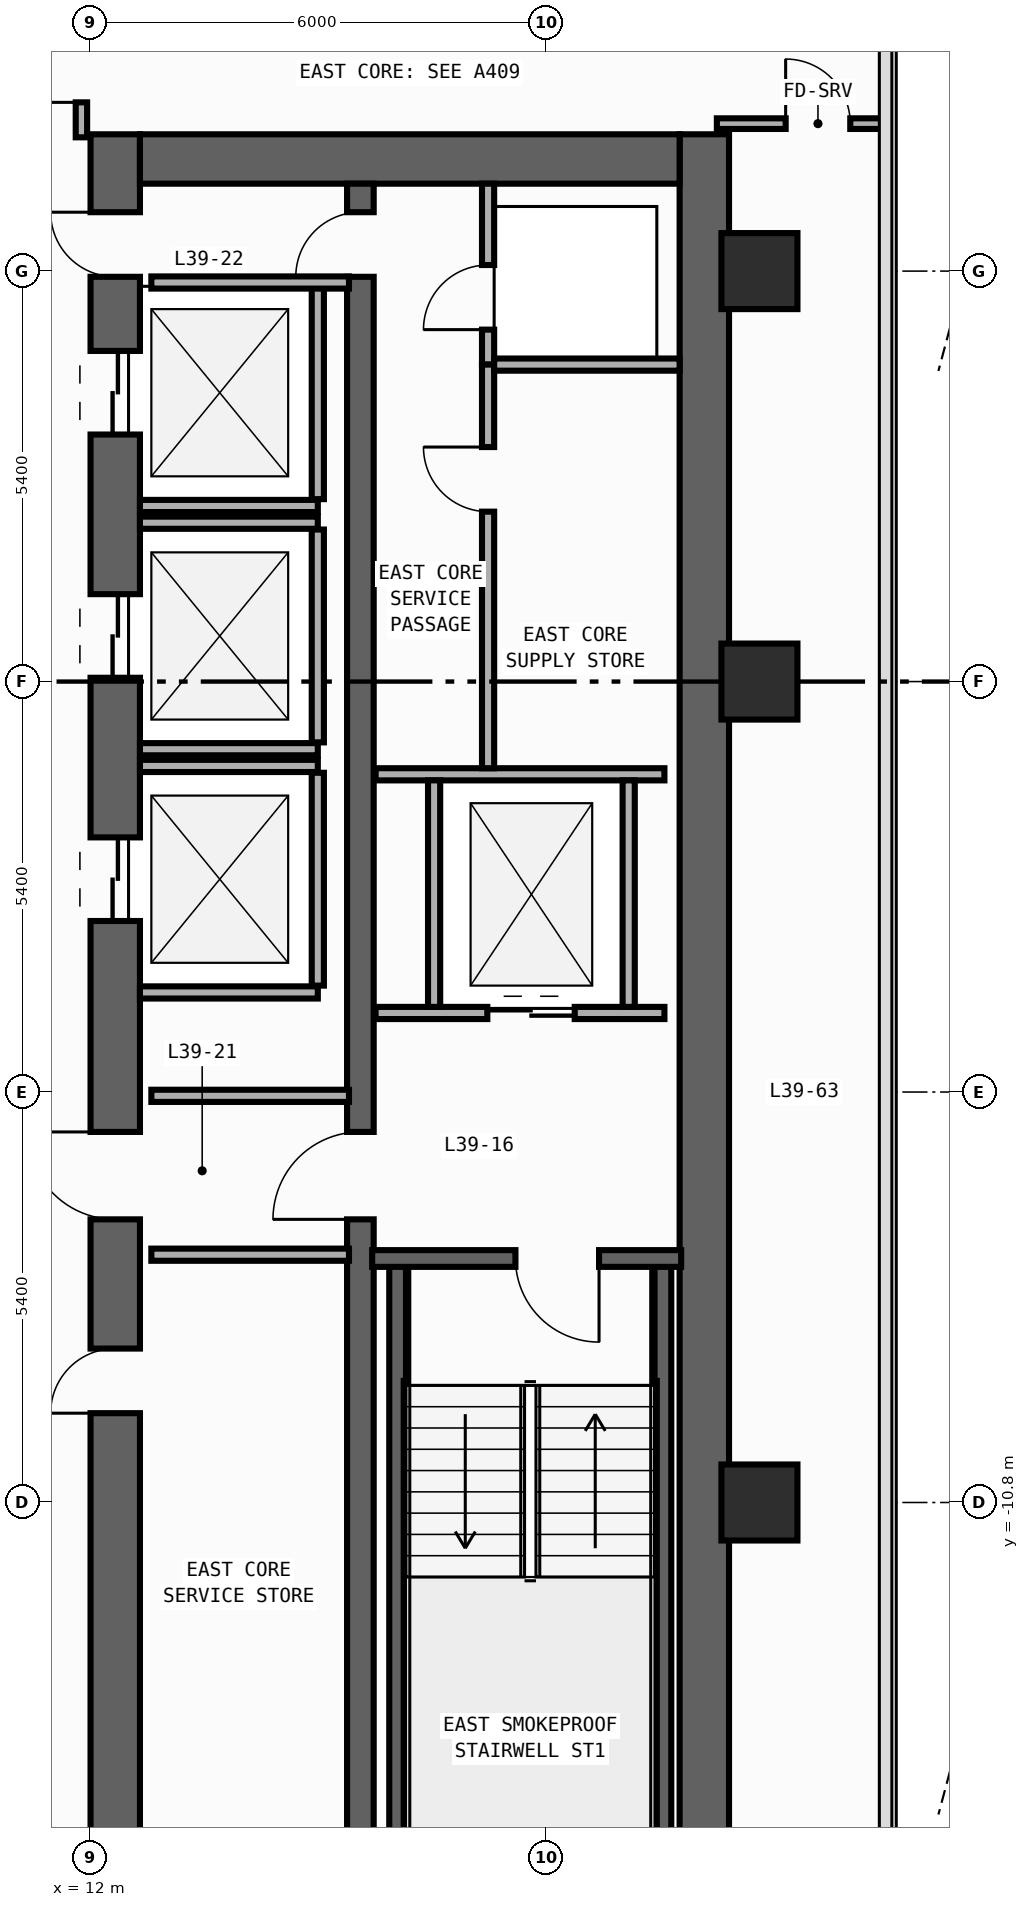
"""IFC4 building model, lengths in metres.
Left out: names, types, materials, properties, quantities, classifications, styles, units other than length and angle.
Written with IfcOpenShell. Run it as: python <this file> out.ifc"""

import sys

from ifc_helpers import new_model, si_unit, direction, frame, frame_2d, origin, origin_2d, place, context, subcontext, project, spatial, rectangle, extrude, element, fill, save


model = new_model("IFC4")
c1 = context("Model", 3, precision=1e-05, world=origin(), true_north=direction((0.0, 1.0)))
c2 = subcontext(c1, "Body", "Model", "MODEL_VIEW")
j1 = project(units=[si_unit("LENGTHUNIT", "METRE"), si_unit("PLANEANGLEUNIT", "RADIAN")], contexts=[c1])
p1 = place(None, origin())
s1 = spatial("IfcSite", under=j1, at=p1, CompositionType="ELEMENT")
p2 = place(p1, origin())
s2 = spatial("IfcBuilding", under=s1, at=p2, CompositionType="ELEMENT")
p3 = place(p2, frame((0.0, 0.0, 172.6)))
s3 = spatial("IfcBuildingStorey", under=s2, at=p3, CompositionType="ELEMENT", Elevation=172.6)
p4 = place(p3, frame((12.325, -19.8, 0.0), z_axis=(0.0, 0.0, 1.0), x_axis=(0.0, 1.0, 0.0)))
e1 = element("IfcWall", 1, at=p4, inside=s3, PredefinedType="SHEAR", context=c2, shape_type="SweptSolid", body=[
    extrude(rectangle(XDim=27.0, YDim=0.65, at=frame_2d((13.5, 0.0))), origin(), (0.0, 0.0, 1.0), 3.54),
])
p5 = place(p4, frame((23.05, 0.0, 0.0)))
e2 = element("IfcOpeningElement", 2, at=p5, cuts=e1, PredefinedType="OPENING", context=c2, shape_type="SweptSolid", body=[
    extrude(rectangle(XDim=1.1, YDim=2.2, at=frame_2d((0.55, 1.1))), frame((0.0, 0.335, 0.0), z_axis=(0.0, -1.0, 0.0), x_axis=(1.0, 0.0, 0.0)), (0.0, 0.0, 1.0), 0.67),
])
p6 = place(p4, frame((19.85, 0.0, 0.0)))
e3 = element("IfcOpeningElement", 3, at=p6, cuts=e1, PredefinedType="OPENING", context=c2, shape_type="SweptSolid", body=[
    extrude(rectangle(XDim=1.1, YDim=2.2, at=frame_2d((0.55, 1.1))), frame((0.0, 0.335, 0.0), z_axis=(0.0, -1.0, 0.0), x_axis=(1.0, 0.0, 0.0)), (0.0, 0.0, 1.0), 0.67),
])
p7 = place(p4, frame((16.65, 0.0, 0.0)))
e4 = element("IfcOpeningElement", 4, at=p7, cuts=e1, PredefinedType="OPENING", context=c2, shape_type="SweptSolid", body=[
    extrude(rectangle(XDim=1.1, YDim=2.2, at=frame_2d((0.55, 1.1))), frame((0.0, 0.335, 0.0), z_axis=(0.0, -1.0, 0.0), x_axis=(1.0, 0.0, 0.0)), (0.0, 0.0, 1.0), 0.67),
])
p8 = place(p4, frame((10.175, 0.0, 0.0)))
e5 = element("IfcOpeningElement", 5, at=p8, cuts=e1, PredefinedType="OPENING", context=c2, shape_type="SweptSolid", body=[
    extrude(rectangle(XDim=0.85, YDim=2.1, at=frame_2d((0.425, 1.05))), frame((0.0, 0.335, 0.0), z_axis=(0.0, -1.0, 0.0), x_axis=(1.0, 0.0, 0.0)), (0.0, 0.0, 1.0), 0.67),
])
p9 = place(p4, frame((12.725, 0.0, 0.0)))
e6 = element("IfcOpeningElement", 6, at=p9, cuts=e1, PredefinedType="OPENING", context=c2, shape_type="SweptSolid", body=[
    extrude(rectangle(XDim=1.15, YDim=2.2, at=frame_2d((0.575, 1.1))), frame((0.0, 0.335, 0.0), z_axis=(0.0, -1.0, 0.0), x_axis=(1.0, 0.0, 0.0)), (0.0, 0.0, 1.0), 0.67),
])
p10 = place(p4, frame((25.125, 0.0, 0.0)))
e7 = element("IfcOpeningElement", 7, at=p10, cuts=e1, PredefinedType="OPENING", context=c2, shape_type="SweptSolid", body=[
    extrude(rectangle(XDim=0.85, YDim=2.1, at=frame_2d((0.425, 1.05))), frame((0.0, 0.335, 0.0), z_axis=(0.0, -1.0, 0.0), x_axis=(1.0, 0.0, 0.0)), (0.0, 0.0, 1.0), 0.67),
])
p11 = place(p3, frame((20.075, -19.8, 0.0), z_axis=(0.0, 0.0, 1.0), x_axis=(0.0, 1.0, 0.0)))
e8 = element("IfcWall", 8, at=p11, inside=s3, PredefinedType="SHEAR", context=c2, shape_type="SweptSolid", body=[
    extrude(rectangle(XDim=27.0, YDim=0.65, at=frame_2d((13.5, 0.0))), origin(), (0.0, 0.0, 1.0), 3.54),
])
p12 = place(p3, frame((12.65, 6.875, 0.0), z_axis=(0.0, 0.0, 1.0), x_axis=(1.0, 0.0, 0.0)))
e9 = element("IfcWall", 9, at=p12, inside=s3, PredefinedType="SHEAR", context=c2, shape_type="SweptSolid", body=[
    extrude(rectangle(XDim=7.1, YDim=0.65, at=frame_2d((3.55, 0.0))), origin(), (0.0, 0.0, 1.0), 3.54),
])
p13 = place(p3, frame((15.55, -19.15, 0.0), z_axis=(0.0, 0.0, 1.0), x_axis=(0.0, 1.0, 0.0)))
e10 = element("IfcWall", 10, at=p13, inside=s3, PredefinedType="SHEAR", context=c2, shape_type="SweptSolid", body=[
    extrude(rectangle(XDim=25.7, YDim=0.35, at=frame_2d((12.85, 0.0))), origin(), (0.0, 0.0, 1.0), 3.54),
])
p14 = place(p13, frame((12.075, 0.0, 0.0)))
e11 = element("IfcOpeningElement", 11, at=p14, cuts=e10, PredefinedType="OPENING", context=c2, shape_type="SweptSolid", body=[
    extrude(rectangle(XDim=1.15, YDim=2.2, at=frame_2d((0.575, 1.1))), frame((0.0, 0.185, 0.0), z_axis=(0.0, -1.0, 0.0), x_axis=(1.0, 0.0, 0.0)), (0.0, 0.0, 1.0), 0.37),
])
p15 = place(p13, frame((24.475, 0.0, 0.0)))
e12 = element("IfcOpeningElement", 12, at=p15, cuts=e10, PredefinedType="OPENING", context=c2, shape_type="SweptSolid", body=[
    extrude(rectangle(XDim=0.85, YDim=2.1, at=frame_2d((0.425, 1.05))), frame((0.0, 0.185, 0.0), z_axis=(0.0, -1.0, 0.0), x_axis=(1.0, 0.0, 0.0)), (0.0, 0.0, 1.0), 0.37),
])
for number, where, z_axis, x_axis in (
    (13, (16.04, -19.01, 0.0), (0.0, 0.0, 1.0), (0.0, 1.0, 0.0)),
    (14, (19.53, -19.01, 0.0), (0.0, 0.0, 1.0), (0.0, 1.0, 0.0)),
):
    element("IfcWall", number, at=place(p3, frame(where, z_axis=z_axis, x_axis=x_axis)), inside=s3, PredefinedType="SHEAR", context=c2, shape_type="SweptSolid", body=[
        extrude(rectangle(XDim=11.42, YDim=0.22, at=frame_2d((5.71, 0.0))), origin(), (0.0, 0.0, 1.0), 3.54),
    ])
p16 = place(p3, frame((19.77, -7.59, 0.0), z_axis=(0.0, 0.0, 1.0), x_axis=(-1.0, 0.0, 0.0)))
e15 = element("IfcWall", 15, at=p16, inside=s3, PredefinedType="SHEAR", context=c2, shape_type="SweptSolid", body=[
    extrude(rectangle(XDim=4.065, YDim=0.22, at=frame_2d((2.032, 0.0))), origin(), (0.0, 0.0, 1.0), 3.54),
])
p17 = place(p16, frame((1.08, 0.0, 0.0)))
e16 = element("IfcOpeningElement", 16, at=p17, cuts=e15, PredefinedType="OPENING", context=c2, shape_type="SweptSolid", body=[
    extrude(rectangle(XDim=1.1, YDim=2.2, at=frame_2d((0.55, 1.1))), frame((0.0, 0.12, 0.0), z_axis=(0.0, -1.0, 0.0), x_axis=(1.0, 0.0, 0.0)), (0.0, 0.0, 1.0), 0.24),
])
for number, where, z_axis, x_axis in (
    (17, (20.8, -10.8, 0.0), (0.0, 0.0, 1.0), (1.0, 0.0, 0.0)),
    (18, (20.8, 0.0, 0.0), (0.0, 0.0, 1.0), (1.0, 0.0, 0.0)),
    (19, (20.8, 5.4, 0.0), (0.0, 0.0, 1.0), (1.0, 0.0, 0.0)),
):
    element("IfcColumn", number, at=place(p3, frame(where, z_axis=z_axis, x_axis=x_axis)), inside=s3, PredefinedType="COLUMN", context=c2, shape_type="SweptSolid", body=[
        extrude(rectangle(XDim=1.0, YDim=1.0, at=origin_2d()), origin(), (0.0, 0.0, 1.0), 3.8),
    ])
p18 = place(p3, frame((12.65, 2.31, 0.0), z_axis=(0.0, 0.0, 1.0), x_axis=(1.0, 0.0, 0.0)))
e20 = element("IfcWall", 20, at=p18, inside=s3, PredefinedType="STANDARD", context=c2, shape_type="SweptSolid", body=[
    extrude(rectangle(XDim=2.34, YDim=0.16, at=frame_2d((1.17, 0.0))), origin(), (0.0, 0.0, 1.0), 3.54),
])
p19 = place(p3, frame((14.99, 2.4, 0.0), z_axis=(0.0, 0.0, 1.0), x_axis=(0.0, 1.0, 0.0)))
e21 = element("IfcWall", 21, at=p19, inside=s3, PredefinedType="STANDARD", context=c2, shape_type="SweptSolid", body=[
    extrude(rectangle(XDim=2.8, YDim=0.16, at=frame_2d((1.4, 0.0))), origin(), (0.0, 0.0, 1.0), 3.54),
])
for number, where, z_axis, x_axis in (
    (22, (12.65, -0.89, 0.0), (0.0, 0.0, 1.0), (1.0, 0.0, 0.0)),
    (23, (12.65, 2.09, 0.0), (0.0, 0.0, 1.0), (1.0, 0.0, 0.0)),
):
    element("IfcWall", number, at=place(p3, frame(where, z_axis=z_axis, x_axis=x_axis)), inside=s3, PredefinedType="STANDARD", context=c2, shape_type="SweptSolid", body=[
        extrude(rectangle(XDim=2.34, YDim=0.16, at=frame_2d((1.17, 0.0))), origin(), (0.0, 0.0, 1.0), 3.54),
    ])
p20 = place(p3, frame((14.99, -0.8, 0.0), z_axis=(0.0, 0.0, 1.0), x_axis=(0.0, 1.0, 0.0)))
e24 = element("IfcWall", 24, at=p20, inside=s3, PredefinedType="STANDARD", context=c2, shape_type="SweptSolid", body=[
    extrude(rectangle(XDim=2.8, YDim=0.16, at=frame_2d((1.4, 0.0))), origin(), (0.0, 0.0, 1.0), 3.54),
])
for number, where, z_axis, x_axis in (
    (25, (12.65, -4.09, 0.0), (0.0, 0.0, 1.0), (1.0, 0.0, 0.0)),
    (26, (12.65, -1.11, 0.0), (0.0, 0.0, 1.0), (1.0, 0.0, 0.0)),
):
    element("IfcWall", number, at=place(p3, frame(where, z_axis=z_axis, x_axis=x_axis)), inside=s3, PredefinedType="STANDARD", context=c2, shape_type="SweptSolid", body=[
        extrude(rectangle(XDim=2.34, YDim=0.16, at=frame_2d((1.17, 0.0))), origin(), (0.0, 0.0, 1.0), 3.54),
    ])
p21 = place(p3, frame((14.99, -4.0, 0.0), z_axis=(0.0, 0.0, 1.0), x_axis=(0.0, 1.0, 0.0)))
e27 = element("IfcWall", 27, at=p21, inside=s3, PredefinedType="STANDARD", context=c2, shape_type="SweptSolid", body=[
    extrude(rectangle(XDim=2.8, YDim=0.16, at=frame_2d((1.4, 0.0))), origin(), (0.0, 0.0, 1.0), 3.54),
])
p22 = place(p3, frame((15.75, -4.36, 0.0), z_axis=(0.0, 0.0, 1.0), x_axis=(1.0, 0.0, 0.0)))
e28 = element("IfcWall", 28, at=p22, inside=s3, PredefinedType="STANDARD", context=c2, shape_type="SweptSolid", body=[
    extrude(rectangle(XDim=3.8, YDim=0.16, at=frame_2d((1.9, 0.0))), origin(), (0.0, 0.0, 1.0), 3.54),
])
p23 = place(p22, frame((1.47, 0.0, 0.0)))
e29 = element("IfcOpeningElement", 29, at=p23, cuts=e28, PredefinedType="OPENING", context=c2, shape_type="SweptSolid", body=[
    extrude(rectangle(XDim=1.15, YDim=2.2, at=frame_2d((0.575, 1.1))), frame((0.0, 0.09, 0.0), z_axis=(0.0, -1.0, 0.0), x_axis=(1.0, 0.0, 0.0)), (0.0, 0.0, 1.0), 0.18),
])
p24 = place(p3, frame((15.75, -1.22, 0.0), z_axis=(0.0, 0.0, 1.0), x_axis=(1.0, 0.0, 0.0)))
e30 = element("IfcWall", 30, at=p24, inside=s3, PredefinedType="STANDARD", context=c2, shape_type="SweptSolid", body=[
    extrude(rectangle(XDim=3.8, YDim=0.16, at=frame_2d((1.9, 0.0))), origin(), (0.0, 0.0, 1.0), 3.54),
])
for number, where, z_axis, x_axis in (
    (31, (16.52, -4.28, 0.0), (0.0, 0.0, 1.0), (0.0, 1.0, 0.0)),
    (32, (19.08, -4.28, 0.0), (0.0, 0.0, 1.0), (0.0, 1.0, 0.0)),
):
    element("IfcWall", number, at=place(p3, frame(where, z_axis=z_axis, x_axis=x_axis)), inside=s3, PredefinedType="STANDARD", context=c2, shape_type="SweptSolid", body=[
        extrude(rectangle(XDim=2.98, YDim=0.16, at=frame_2d((1.49, 0.0))), origin(), (0.0, 0.0, 1.0), 3.54),
    ])
for number, where, z_axis, x_axis in (
    (33, (12.8, -5.45, 0.0), (0.0, 0.0, 1.0), (1.0, 0.0, 0.0)),
    (34, (12.8, -7.54, 0.0), (0.0, 0.0, 1.0), (1.0, 0.0, 0.0)),
    (35, (12.8, 5.25, 0.0), (0.0, 0.0, 1.0), (1.0, 0.0, 0.0)),
):
    element("IfcWall", number, at=place(p3, frame(where, z_axis=z_axis, x_axis=x_axis)), inside=s3, PredefinedType="STANDARD", context=c2, shape_type="SweptSolid", body=[
        extrude(rectangle(XDim=2.6, YDim=0.16, at=frame_2d((1.3, 0.0))), origin(), (0.0, 0.0, 1.0), 3.54),
    ])
p25 = place(p3, frame((17.23, 4.17, 0.0), z_axis=(0.0, 0.0, 1.0), x_axis=(0.0, 1.0, 0.0)))
e36 = element("IfcWall", 36, at=p25, inside=s3, PredefinedType="PARTITIONING", context=c2, shape_type="SweptSolid", body=[
    extrude(rectangle(XDim=2.38, YDim=0.16, at=frame_2d((1.19, 0.0))), origin(), (0.0, 0.0, 1.0), 3.54),
])
p26 = place(p25, frame((0.46, 0.0, 0.0)))
e37 = element("IfcOpeningElement", 37, at=p26, cuts=e36, PredefinedType="OPENING", context=c2, shape_type="SweptSolid", body=[
    extrude(rectangle(XDim=0.85, YDim=2.1, at=frame_2d((0.425, 1.05))), frame((0.0, 0.09, 0.0), z_axis=(0.0, -1.0, 0.0), x_axis=(1.0, 0.0, 0.0)), (0.0, 0.0, 1.0), 0.18),
])
p27 = place(p3, frame((17.23, -1.14, 0.0), z_axis=(0.0, 0.0, 1.0), x_axis=(0.0, 1.0, 0.0)))
e38 = element("IfcWall", 38, at=p27, inside=s3, PredefinedType="PARTITIONING", context=c2, shape_type="SweptSolid", body=[
    extrude(rectangle(XDim=5.31, YDim=0.16, at=frame_2d((2.655, 0.0))), origin(), (0.0, 0.0, 1.0), 3.54),
])
p28 = place(p27, frame((3.375, 0.0, 0.0)))
e39 = element("IfcOpeningElement", 39, at=p28, cuts=e38, PredefinedType="OPENING", context=c2, shape_type="SweptSolid", body=[
    extrude(rectangle(XDim=0.85, YDim=2.1, at=frame_2d((0.425, 1.05))), frame((0.0, 0.09, 0.0), z_axis=(0.0, -1.0, 0.0), x_axis=(1.0, 0.0, 0.0)), (0.0, 0.0, 1.0), 0.18),
])
p29 = place(p3, frame((17.31, 4.17, 0.0), z_axis=(0.0, 0.0, 1.0), x_axis=(1.0, 0.0, 0.0)))
e40 = element("IfcWall", 40, at=p29, inside=s3, PredefinedType="PARTITIONING", context=c2, shape_type="SweptSolid", body=[
    extrude(rectangle(XDim=2.44, YDim=0.16, at=frame_2d((1.22, 0.0))), origin(), (0.0, 0.0, 1.0), 3.54),
])
p30 = place(p3, frame((11.88, 7.16, 0.0), z_axis=(0.0, 0.0, 1.0), x_axis=(0.0, 1.0, 0.0)))
e41 = element("IfcWall", 41, at=p30, inside=s3, PredefinedType="PARTITIONING", context=c2, shape_type="SweptSolid", body=[
    extrude(rectangle(XDim=8.455, YDim=0.15, at=frame_2d((4.228, 0.0))), origin(), (0.0, 0.0, 1.0), 3.54),
])
p31 = place(p30, frame((0.46, 0.0, 0.0)))
e42 = element("IfcOpeningElement", 42, at=p31, cuts=e41, PredefinedType="OPENING", context=c2, shape_type="SweptSolid", body=[
    extrude(rectangle(XDim=0.9, YDim=2.15, at=frame_2d((0.45, 1.075))), frame((0.0, 0.085, 0.0), z_axis=(0.0, -1.0, 0.0), x_axis=(1.0, 0.0, 0.0)), (0.0, 0.0, 1.0), 0.17),
])
p32 = place(p3, frame((20.24, 7.34, 0.0), z_axis=(0.0, 0.0, 1.0), x_axis=(1.0, 0.0, 0.0)))
e43 = element("IfcWall", 43, at=p32, inside=s3, PredefinedType="PARTITIONING", context=c2, shape_type="SweptSolid", body=[
    extrude(rectangle(XDim=2.215, YDim=0.14, at=frame_2d((1.107, 0.0))), origin(), (0.0, 0.0, 1.0), 3.54),
])
p33 = place(p32, frame((0.905, 0.0, 0.0)))
e44 = element("IfcOpeningElement", 44, at=p33, cuts=e43, PredefinedType="OPENING", context=c2, shape_type="SweptSolid", body=[
    extrude(rectangle(XDim=0.85, YDim=2.1, at=frame_2d((0.425, 1.05))), frame((0.0, 0.08, 0.0), z_axis=(0.0, -1.0, 0.0), x_axis=(1.0, 0.0, 0.0)), (0.0, 0.0, 1.0), 0.16),
])
p34 = place(p17, origin())
e45 = element("IfcDoor", 45, at=p34, inside=s3, OperationType="SINGLE_SWING_LEFT", PredefinedType="DOOR", context=c2, shape_type="SweptSolid", body=[
    extrude(rectangle(XDim=1.1, YDim=2.2, at=frame_2d((0.55, 1.1))), frame((0.0, 0.025, 0.0), z_axis=(0.0, -1.0, 0.0), x_axis=(1.0, 0.0, 0.0)), (0.0, 0.0, 1.0), 0.05),
])
fill(e16, e45)
p35 = place(p5, origin())
e46 = element("IfcDoor", 46, at=p35, inside=s3, OperationType="DOUBLE_DOOR_SLIDING", PredefinedType="DOOR", context=c2, shape_type="SweptSolid", body=[
    extrude(rectangle(XDim=1.1, YDim=2.2, at=frame_2d((0.55, 1.1))), frame((0.0, 0.025, 0.0), z_axis=(0.0, -1.0, 0.0), x_axis=(1.0, 0.0, 0.0)), (0.0, 0.0, 1.0), 0.05),
])
fill(e2, e46)
p36 = place(p6, origin())
e47 = element("IfcDoor", 47, at=p36, inside=s3, OperationType="DOUBLE_DOOR_SLIDING", PredefinedType="DOOR", context=c2, shape_type="SweptSolid", body=[
    extrude(rectangle(XDim=1.1, YDim=2.2, at=frame_2d((0.55, 1.1))), frame((0.0, 0.025, 0.0), z_axis=(0.0, -1.0, 0.0), x_axis=(1.0, 0.0, 0.0)), (0.0, 0.0, 1.0), 0.05),
])
fill(e3, e47)
p37 = place(p7, origin())
e48 = element("IfcDoor", 48, at=p37, inside=s3, OperationType="DOUBLE_DOOR_SLIDING", PredefinedType="DOOR", context=c2, shape_type="SweptSolid", body=[
    extrude(rectangle(XDim=1.1, YDim=2.2, at=frame_2d((0.55, 1.1))), frame((0.0, 0.025, 0.0), z_axis=(0.0, -1.0, 0.0), x_axis=(1.0, 0.0, 0.0)), (0.0, 0.0, 1.0), 0.05),
])
fill(e4, e48)
p38 = place(p8, origin())
e49 = element("IfcDoor", 49, at=p38, inside=s3, OperationType="SINGLE_SWING_LEFT", PredefinedType="DOOR", context=c2, shape_type="SweptSolid", body=[
    extrude(rectangle(XDim=0.85, YDim=2.1, at=frame_2d((0.425, 1.05))), frame((0.0, 0.025, 0.0), z_axis=(0.0, -1.0, 0.0), x_axis=(1.0, 0.0, 0.0)), (0.0, 0.0, 1.0), 0.05),
])
fill(e5, e49)
p39 = place(p9, origin())
e50 = element("IfcDoor", 50, at=p39, inside=s3, OperationType="SINGLE_SWING_RIGHT", PredefinedType="DOOR", context=c2, shape_type="SweptSolid", body=[
    extrude(rectangle(XDim=1.15, YDim=2.2, at=frame_2d((0.575, 1.1))), frame((0.0, 0.025, 0.0), z_axis=(0.0, -1.0, 0.0), x_axis=(1.0, 0.0, 0.0)), (0.0, 0.0, 1.0), 0.05),
])
fill(e6, e50)
p40 = place(p14, origin())
e51 = element("IfcDoor", 51, at=p40, inside=s3, OperationType="SINGLE_SWING_LEFT", PredefinedType="DOOR", context=c2, shape_type="SweptSolid", body=[
    extrude(rectangle(XDim=1.15, YDim=2.2, at=frame_2d((0.575, 1.1))), frame((0.0, 0.025, 0.0), z_axis=(0.0, -1.0, 0.0), x_axis=(1.0, 0.0, 0.0)), (0.0, 0.0, 1.0), 0.05),
])
fill(e11, e51)
p41 = place(p10, origin())
e52 = element("IfcDoor", 52, at=p41, inside=s3, OperationType="SINGLE_SWING_RIGHT", PredefinedType="DOOR", context=c2, shape_type="SweptSolid", body=[
    extrude(rectangle(XDim=0.85, YDim=2.1, at=frame_2d((0.425, 1.05))), frame((0.0, 0.025, 0.0), z_axis=(0.0, -1.0, 0.0), x_axis=(1.0, 0.0, 0.0)), (0.0, 0.0, 1.0), 0.05),
])
fill(e7, e52)
p42 = place(p15, origin())
e53 = element("IfcDoor", 53, at=p42, inside=s3, OperationType="SINGLE_SWING_LEFT", PredefinedType="DOOR", context=c2, shape_type="SweptSolid", body=[
    extrude(rectangle(XDim=0.85, YDim=2.1, at=frame_2d((0.425, 1.05))), frame((0.0, 0.025, 0.0), z_axis=(0.0, -1.0, 0.0), x_axis=(1.0, 0.0, 0.0)), (0.0, 0.0, 1.0), 0.05),
])
fill(e12, e53)
p43 = place(p23, origin())
e54 = element("IfcDoor", 54, at=p43, inside=s3, OperationType="DOUBLE_DOOR_SLIDING", PredefinedType="DOOR", context=c2, shape_type="SweptSolid", body=[
    extrude(rectangle(XDim=1.15, YDim=2.2, at=frame_2d((0.575, 1.1))), frame((0.0, 0.025, 0.0), z_axis=(0.0, -1.0, 0.0), x_axis=(1.0, 0.0, 0.0)), (0.0, 0.0, 1.0), 0.05),
])
fill(e29, e54)
p44 = place(p26, origin())
e55 = element("IfcDoor", 55, at=p44, inside=s3, OperationType="SINGLE_SWING_LEFT", PredefinedType="DOOR", context=c2, shape_type="SweptSolid", body=[
    extrude(rectangle(XDim=0.85, YDim=2.1, at=frame_2d((0.425, 1.05))), frame((0.0, 0.025, 0.0), z_axis=(0.0, -1.0, 0.0), x_axis=(1.0, 0.0, 0.0)), (0.0, 0.0, 1.0), 0.05),
])
fill(e37, e55)
p45 = place(p28, origin())
e56 = element("IfcDoor", 56, at=p45, inside=s3, OperationType="SINGLE_SWING_RIGHT", PredefinedType="DOOR", context=c2, shape_type="SweptSolid", body=[
    extrude(rectangle(XDim=0.85, YDim=2.1, at=frame_2d((0.425, 1.05))), frame((0.0, 0.025, 0.0), z_axis=(0.0, -1.0, 0.0), x_axis=(1.0, 0.0, 0.0)), (0.0, 0.0, 1.0), 0.05),
])
fill(e39, e56)
p46 = place(p31, origin())
e57 = element("IfcDoor", 57, at=p46, inside=s3, OperationType="SINGLE_SWING_LEFT", PredefinedType="DOOR", context=c2, shape_type="SweptSolid", body=[
    extrude(rectangle(XDim=0.9, YDim=2.15, at=frame_2d((0.45, 1.075))), frame((0.0, 0.025, 0.0), z_axis=(0.0, -1.0, 0.0), x_axis=(1.0, 0.0, 0.0)), (0.0, 0.0, 1.0), 0.05),
])
fill(e42, e57)
p47 = place(p33, origin())
e58 = element("IfcDoor", 58, at=p47, inside=s3, OperationType="SINGLE_SWING_LEFT", PredefinedType="DOOR", context=c2, shape_type="SweptSolid", body=[
    extrude(rectangle(XDim=0.85, YDim=2.1, at=frame_2d((0.425, 1.05))), frame((0.0, 0.025, 0.0), z_axis=(0.0, -1.0, 0.0), x_axis=(1.0, 0.0, 0.0)), (0.0, 0.0, 1.0), 0.05),
])
fill(e44, e58)
save(model, sys.argv[1])
